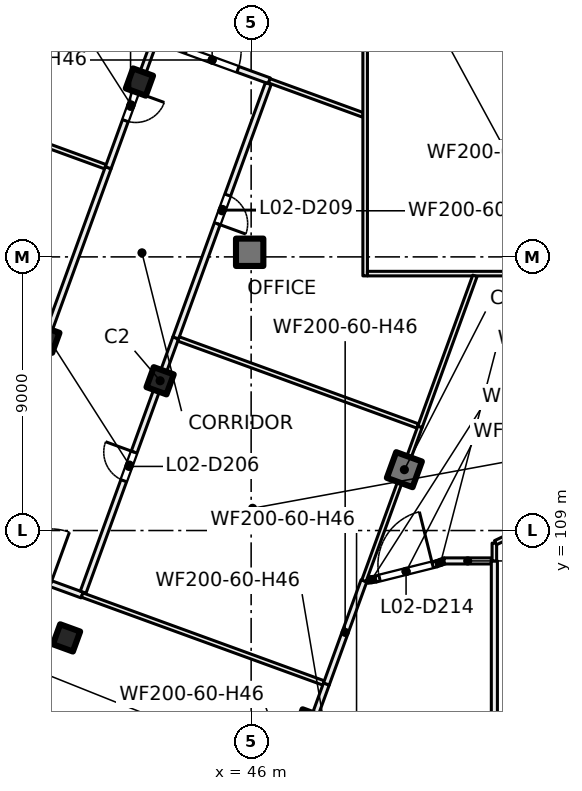
"""IFC4 building model, lengths in metres.
Left out: names, types, materials, properties, quantities, classifications, styles, units other than length and angle.
Written with IfcOpenShell. Run it as: python <this file> out.ifc"""

import sys

from ifc_helpers import new_model, si_unit, direction, frame, frame_2d, origin, origin_2d, place, context, subcontext, project, spatial, rectangle, extrude, element, fill, save


model = new_model("IFC4")
c1 = context("Model", 3, precision=1e-05, world=origin(), true_north=direction((0.0, 1.0)))
c2 = subcontext(c1, "Body", "Model", "MODEL_VIEW")
j1 = project(units=[si_unit("LENGTHUNIT", "METRE"), si_unit("PLANEANGLEUNIT", "RADIAN")], contexts=[c1])
p1 = place(None, origin())
s1 = spatial("IfcSite", under=j1, at=p1, CompositionType="ELEMENT")
p2 = place(p1, origin())
s2 = spatial("IfcBuilding", under=s1, at=p2, CompositionType="ELEMENT")
p3 = place(p2, frame((0.0, 0.0, 12.5)))
s3 = spatial("IfcBuildingStorey", under=s2, at=p3, CompositionType="ELEMENT", Elevation=12.5)
p4 = place(p3, frame((45.952, 118.152, 0.0), z_axis=(0.0, 0.0, 1.0), x_axis=(1.0, 0.0, 0.0)))
e1 = element("IfcColumn", 1, at=p4, inside=s3, PredefinedType="COLUMN", context=c2, shape_type="SweptSolid", body=[
    extrude(rectangle(XDim=0.9, YDim=0.9, at=origin_2d()), origin(), (0.0, 0.0, 1.0), 5.0),
])
for number, where, z_axis, x_axis in (
    (2, (43.006, 113.925, 0.0), (0.0, 0.0, 1.0), (-0.342, -0.94, 0.0)),
    (3, (39.927, 105.468, 0.0), (0.0, 0.0, 1.0), (-0.342, -0.94, 0.0)),
    (4, (42.325, 123.751, 0.0), (0.0, 0.0, 1.0), (-0.342, -0.94, 0.0)),
    (5, (39.247, 115.293, 0.0), (0.0, 0.0, 1.0), (-0.342, -0.94, 0.0)),
):
    element("IfcColumn", number, at=place(p3, frame(where, z_axis=z_axis, x_axis=x_axis)), inside=s3, PredefinedType="COLUMN", context=c2, shape_type="SweptSolid", body=[
        extrude(rectangle(XDim=0.7, YDim=0.7, at=origin_2d()), origin(), (0.0, 0.0, 1.0), 5.0),
    ])
for number, where, z_axis, x_axis in (
    (6, (51.04, 111.001, 0.0), (0.0, 0.0, 1.0), (-0.342, -0.94, 0.0)),
    (7, (47.962, 102.544, 0.0), (0.0, 0.0, 1.0), (-0.342, -0.94, 0.0)),
):
    element("IfcColumn", number, at=place(p3, frame(where, z_axis=z_axis, x_axis=x_axis)), inside=s3, PredefinedType="COLUMN", context=c2, shape_type="SweptSolid", body=[
        extrude(rectangle(XDim=0.9, YDim=0.9, at=origin_2d()), origin(), (0.0, 0.0, 1.0), 5.0),
    ])
p5 = place(p3, frame((33.335, 123.83, 0.0), z_axis=(0.0, 0.0, 1.0), x_axis=(0.939710837098, -0.341970090272, 0.0)))
e8 = element("IfcWall", 8, at=p5, inside=s3, PredefinedType="PARTITIONING", context=c2, shape_type="SweptSolid", body=[
    extrude(rectangle(XDim=8.375, YDim=0.15, at=frame_2d((4.188, 0.0))), origin(), (0.0, 0.0, 1.0), 4.6),
])
p6 = place(p3, frame((40.44, 106.878, 0.0), z_axis=(0.0, 0.0, 1.0), x_axis=(-0.939665029144, 0.342095941228, 0.0)))
e9 = element("IfcWall", 9, at=p6, inside=s3, PredefinedType="PARTITIONING", context=c2, shape_type="SweptSolid", body=[
    extrude(rectangle(XDim=3.999, YDim=0.2, at=frame_2d((2.0, 0.0))), origin(), (0.0, 0.0, 1.0), 4.6),
])
p7 = place(p6, frame((1.099, 0.0, 0.0)))
e10 = element("IfcOpeningElement", 10, at=p7, cuts=e9, PredefinedType="OPENING", context=c2, shape_type="SweptSolid", body=[
    extrude(rectangle(XDim=1.8, YDim=2.1, at=frame_2d((0.9, 1.05))), frame((0.0, 0.11, 0.0), z_axis=(0.0, -1.0, 0.0), x_axis=(1.0, 0.0, 0.0)), (0.0, 0.0, 1.0), 0.22),
])
p8 = place(p3, frame((36.716, 108.34, 0.0), z_axis=(0.0, 0.0, 1.0), x_axis=(0.342018071111, 0.939693375008, 0.0)))
e11 = element("IfcWall", 11, at=p8, inside=s3, PredefinedType="PARTITIONING", context=c2, shape_type="SweptSolid", body=[
    extrude(rectangle(XDim=13.4, YDim=0.2, at=frame_2d((6.7, 0.0))), origin(), (0.0, 0.0, 1.0), 4.6),
])
p9 = place(p8, frame((5.952, 0.0, 0.0)))
e12 = element("IfcOpeningElement", 12, at=p9, cuts=e11, PredefinedType="OPENING", context=c2, shape_type="SweptSolid", body=[
    extrude(rectangle(XDim=1.0, YDim=2.1, at=frame_2d((0.5, 1.05))), frame((0.0, 0.11, 0.0), z_axis=(0.0, -1.0, 0.0), x_axis=(1.0, 0.0, 0.0)), (0.0, 0.0, 1.0), 0.22),
])
p10 = place(p3, frame((43.519, 115.335, 0.0), z_axis=(0.0, 0.0, 1.0), x_axis=(-0.342121866134, -0.939655590476, 0.0)))
e13 = element("IfcWall", 13, at=p10, inside=s3, PredefinedType="PARTITIONING", context=c2, shape_type="SweptSolid", body=[
    extrude(rectangle(XDim=8.9, YDim=0.2, at=frame_2d((4.45, 0.0))), origin(), (0.0, 0.0, 1.0), 4.6),
])
p11 = place(p10, frame((3.998, 0.0, 0.0)))
e14 = element("IfcOpeningElement", 14, at=p11, cuts=e13, PredefinedType="OPENING", context=c2, shape_type="SweptSolid", body=[
    extrude(rectangle(XDim=1.0, YDim=2.1, at=frame_2d((0.5, 1.05))), frame((0.0, 0.11, 0.0), z_axis=(0.0, -1.0, 0.0), x_axis=(1.0, 0.0, 0.0)), (0.0, 0.0, 1.0), 0.22),
])
p12 = place(p3, frame((40.44, 106.878, 0.0), z_axis=(0.0, 0.0, 1.0), x_axis=(0.939672748075, -0.342074738216, 0.0)))
e15 = element("IfcWall", 15, at=p12, inside=s3, PredefinedType="PARTITIONING", context=c2, shape_type="SweptSolid", body=[
    extrude(rectangle(XDim=8.451, YDim=0.15, at=frame_2d((4.226, 0.0))), origin(), (0.0, 0.0, 1.0), 4.6),
])
p13 = place(p3, frame((41.299, 120.932, 0.0), z_axis=(0.0, 0.0, 1.0), x_axis=(0.342063854115, 0.939676710208, 0.0)))
e16 = element("IfcWall", 16, at=p13, inside=s3, PredefinedType="PARTITIONING", context=c2, shape_type="SweptSolid", body=[
    extrude(rectangle(XDim=4.399, YDim=0.2, at=frame_2d((2.2, 0.0))), origin(), (0.0, 0.0, 1.0), 4.6),
])
p14 = place(p13, frame((1.648, 0.0, 0.0)))
e17 = element("IfcOpeningElement", 17, at=p14, cuts=e16, PredefinedType="OPENING", context=c2, shape_type="SweptSolid", body=[
    extrude(rectangle(XDim=1.0, YDim=2.1, at=frame_2d((0.5, 1.05))), frame((0.0, 0.11, 0.0), z_axis=(0.0, -1.0, 0.0), x_axis=(1.0, 0.0, 0.0)), (0.0, 0.0, 1.0), 0.22),
])
p15 = place(p3, frame((42.838, 125.16, 0.0), z_axis=(0.0, 0.0, 1.0), x_axis=(0.939713209288, -0.341963571582, 0.0)))
e18 = element("IfcWall", 18, at=p15, inside=s3, PredefinedType="PARTITIONING", context=c2, shape_type="SweptSolid", body=[
    extrude(rectangle(XDim=4.0, YDim=0.2, at=frame_2d((2.0, 0.0))), origin(), (0.0, 0.0, 1.0), 4.6),
])
p16 = place(p15, frame((1.1, 0.0, 0.0)))
e19 = element("IfcOpeningElement", 19, at=p16, cuts=e18, PredefinedType="OPENING", context=c2, shape_type="SweptSolid", body=[
    extrude(rectangle(XDim=1.8, YDim=2.1, at=frame_2d((0.9, 1.05))), frame((0.0, 0.11, 0.0), z_axis=(0.0, -1.0, 0.0), x_axis=(1.0, 0.0, 0.0)), (0.0, 0.0, 1.0), 0.22),
])
p17 = place(p3, frame((46.563, 123.698, 0.0), z_axis=(0.0, 0.0, 1.0), x_axis=(-0.342024978895, -0.939690860768, 0.0)))
e20 = element("IfcWall", 20, at=p17, inside=s3, PredefinedType="PARTITIONING", context=c2, shape_type="SweptSolid", body=[
    extrude(rectangle(XDim=8.9, YDim=0.2, at=frame_2d((4.45, 0.0))), origin(), (0.0, 0.0, 1.0), 4.6),
])
p18 = place(p17, frame((3.902, 0.0, 0.0)))
e21 = element("IfcOpeningElement", 21, at=p18, cuts=e20, PredefinedType="OPENING", context=c2, shape_type="SweptSolid", body=[
    extrude(rectangle(XDim=1.0, YDim=2.1, at=frame_2d((0.5, 1.05))), frame((0.0, 0.11, 0.0), z_axis=(0.0, -1.0, 0.0), x_axis=(1.0, 0.0, 0.0)), (0.0, 0.0, 1.0), 0.22),
])
p19 = place(p3, frame((43.613, 115.301, 0.0), z_axis=(0.0, 0.0, 1.0), x_axis=(0.93970742794, -0.341979458265, 0.0)))
e22 = element("IfcWall", 22, at=p19, inside=s3, PredefinedType="PARTITIONING", context=c2, shape_type="SweptSolid", body=[
    extrude(rectangle(XDim=8.375, YDim=0.15, at=frame_2d((4.188, 0.0))), origin(), (0.0, 0.0, 1.0), 4.6),
])
p20 = place(p3, frame((46.337, 98.08, 0.0), z_axis=(0.0, 0.0, 1.0), x_axis=(0.342113136459, 0.939658768842, 0.0)))
e23 = element("IfcWall", 23, at=p20, inside=s3, PredefinedType="PARTITIONING", context=c2, shape_type="SweptSolid", body=[
    extrude(rectangle(XDim=6.25, YDim=0.2, at=frame_2d((3.125, 0.0))), origin(), (0.0, 0.0, 1.0), 4.6),
])
p21 = place(p20, frame((2.223, 0.0, 0.0)))
e24 = element("IfcOpeningElement", 24, at=p21, cuts=e23, PredefinedType="OPENING", context=c2, shape_type="SweptSolid", body=[
    extrude(rectangle(XDim=1.8, YDim=2.1, at=frame_2d((0.9, 1.05))), frame((0.0, 0.11, 0.0), z_axis=(0.0, -1.0, 0.0), x_axis=(1.0, 0.0, 0.0)), (0.0, 0.0, 1.0), 0.22),
])
p22 = place(p3, frame((46.597, 123.792, 0.0), z_axis=(0.0, 0.0, 1.0), x_axis=(0.939619227089, -0.342221723572, 0.0)))
e25 = element("IfcWall", 25, at=p22, inside=s3, PredefinedType="PARTITIONING", context=c2, shape_type="SweptSolid", body=[
    extrude(rectangle(XDim=3.276, YDim=0.15, at=frame_2d((1.638, 0.0))), origin(), (0.0, 0.0, 1.0), 4.6),
])
p23 = place(p3, frame((48.475, 103.953, 0.0), z_axis=(0.0, 0.0, 1.0), x_axis=(0.341992779494, 0.939702579955, 0.0)))
e26 = element("IfcWall", 26, at=p23, inside=s3, PredefinedType="PARTITIONING", context=c2, shape_type="SweptSolid", body=[
    extrude(rectangle(XDim=3.611, YDim=0.2, at=frame_2d((1.805, 0.0))), origin(), (0.0, 0.0, 1.0), 4.6),
])
p24 = place(p3, frame((49.823, 107.363, 0.0), z_axis=(0.0, 0.0, 1.0), x_axis=(0.988866439098, 0.148805798359, 0.0)))
e27 = element("IfcWall", 27, at=p24, inside=s3, PredefinedType="PARTITIONING", context=c2, shape_type="SweptSolid", body=[
    extrude(rectangle(XDim=0.282, YDim=0.2, at=frame_2d((0.141, 0.0))), origin(), (0.0, 0.0, 1.0), 4.6),
])
p25 = place(p3, frame((49.71, 107.346, 0.0), z_axis=(0.0, 0.0, 1.0), x_axis=(0.341943087223, 0.939720663336, 0.0)))
e28 = element("IfcWall", 28, at=p25, inside=s3, PredefinedType="PARTITIONING", context=c2, shape_type="SweptSolid", body=[
    extrude(rectangle(XDim=5.39, YDim=0.15, at=frame_2d((2.695, 0.0))), origin(), (0.0, 0.0, 1.0), 4.6),
])
p26 = place(p3, frame((49.75, 117.375, 0.0), z_axis=(0.0, 0.0, 1.0), x_axis=(0.0, 1.0, 0.0)))
e29 = element("IfcWall", 29, at=p26, inside=s3, PredefinedType="PARTITIONING", context=c2, shape_type="SweptSolid", body=[
    extrude(rectangle(XDim=8.625, YDim=0.15, at=frame_2d((4.312, 0.0))), origin(), (0.0, 0.0, 1.0), 4.6),
])
p27 = place(p3, frame((49.825, 117.45, 0.0), z_axis=(0.0, 0.0, 1.0), x_axis=(1.0, 0.0, 0.0)))
e30 = element("IfcWall", 30, at=p27, inside=s3, PredefinedType="PARTITIONING", context=c2, shape_type="SweptSolid", body=[
    extrude(rectangle(XDim=41.175, YDim=0.15, at=frame_2d((20.587, 0.0))), origin(), (0.0, 0.0, 1.0), 4.6),
])
p28 = place(p3, frame((52.101, 107.905, 0.0), z_axis=(0.0, 0.0, 1.0), x_axis=(-0.970177165917, -0.242396919811, 0.0)))
e31 = element("IfcWall", 31, at=p28, inside=s3, PredefinedType="PARTITIONING", context=c2, shape_type="SweptSolid", body=[
    extrude(rectangle(XDim=2.071, YDim=0.2, at=frame_2d((1.035, 0.0))), origin(), (0.0, 0.0, 1.0), 4.6),
])
p29 = place(p28, frame((0.136, 0.0, 0.0)))
e32 = element("IfcOpeningElement", 32, at=p29, cuts=e31, PredefinedType="OPENING", context=c2, shape_type="SweptSolid", body=[
    extrude(rectangle(XDim=1.8, YDim=2.1, at=frame_2d((0.9, 1.05))), frame((0.0, 0.11, 0.0), z_axis=(0.0, -1.0, 0.0), x_axis=(1.0, 0.0, 0.0)), (0.0, 0.0, 1.0), 0.22),
])
p30 = place(p3, frame((51.553, 112.411, 0.0), z_axis=(0.0, 0.0, 1.0), x_axis=(0.342076997639, 0.93967192556, 0.0)))
e33 = element("IfcWall", 33, at=p30, inside=s3, PredefinedType="PARTITIONING", context=c2, shape_type="SweptSolid", body=[
    extrude(rectangle(XDim=5.283, YDim=0.15, at=frame_2d((2.641, 0.0))), origin(), (0.0, 0.0, 1.0), 4.6),
])
p31 = place(p3, frame((52.091, 107.902, 0.0), z_axis=(0.0, 0.0, 1.0), x_axis=(0.940856992367, 0.338803954986, 0.0)))
e34 = element("IfcWall", 34, at=p31, inside=s3, PredefinedType="PARTITIONING", context=c2, shape_type="SweptSolid", body=[
    extrude(rectangle(XDim=0.307, YDim=0.2, at=frame_2d((0.153, 0.0))), origin(), (0.0, 0.0, 1.0), 4.6),
])
p32 = place(p3, frame((52.347, 108.0, 0.0), z_axis=(0.0, 0.0, 1.0), x_axis=(1.0, 0.0, 0.0)))
e35 = element("IfcWall", 35, at=p32, inside=s3, PredefinedType="PARTITIONING", context=c2, shape_type="SweptSolid", body=[
    extrude(rectangle(XDim=1.553, YDim=0.2, at=frame_2d((0.776, 0.0))), origin(), (0.0, 0.0, 1.0), 4.6),
])
p33 = place(p3, frame((53.348, 75.152, 0.0), z_axis=(0.0, 0.0, 1.0), x_axis=(0.342006895874, 0.939697442358, 0.0)))
e36 = element("IfcWall", 36, at=p33, inside=s3, PredefinedType="PARTITIONING", context=c2, shape_type="SweptSolid", body=[
    extrude(rectangle(XDim=29.792, YDim=0.3, at=frame_2d((14.896, 0.0))), origin(), (0.0, 0.0, 1.0), 6.1),
])
p34 = place(p3, frame((101.764, 103.0, 0.0), z_axis=(0.0, 0.0, 1.0), x_axis=(-0.866697259032, -0.498834502802, 0.0)))
e37 = element("IfcWall", 37, at=p34, inside=s3, PredefinedType="PARTITIONING", context=c2, shape_type="SweptSolid", body=[
    extrude(rectangle(XDim=55.547, YDim=0.3, at=frame_2d((27.774, 0.0))), origin(), (0.0, 0.0, 1.0), 6.1),
])
p35 = place(p34, frame((43.673, 0.0, 0.0)))
e38 = element("IfcOpeningElement", 38, at=p35, cuts=e37, PredefinedType="OPENING", context=c2, shape_type="SweptSolid", body=[
    extrude(rectangle(XDim=2.0, YDim=2.1, at=frame_2d((1.0, 1.05))), frame((0.0, 0.16, 0.0), z_axis=(0.0, -1.0, 0.0), x_axis=(1.0, 0.0, 0.0)), (0.0, 0.0, 1.0), 0.32),
])
p36 = place(p34, frame((26.921, 0.0, 0.0)))
e39 = element("IfcOpeningElement", 39, at=p36, cuts=e37, PredefinedType="OPENING", context=c2, shape_type="SweptSolid", body=[
    extrude(rectangle(XDim=2.0, YDim=2.1, at=frame_2d((1.0, 1.05))), frame((0.0, 0.16, 0.0), z_axis=(0.0, -1.0, 0.0), x_axis=(1.0, 0.0, 0.0)), (0.0, 0.0, 1.0), 0.32),
])
p37 = place(p34, frame((10.169, 0.0, 0.0)))
e40 = element("IfcOpeningElement", 40, at=p37, cuts=e37, PredefinedType="OPENING", context=c2, shape_type="SweptSolid", body=[
    extrude(rectangle(XDim=2.0, YDim=2.1, at=frame_2d((1.0, 1.05))), frame((0.0, 0.16, 0.0), z_axis=(0.0, -1.0, 0.0), x_axis=(1.0, 0.0, 0.0)), (0.0, 0.0, 1.0), 0.32),
])
p38 = place(p3, frame((54.0, 94.715, 0.0), z_axis=(0.0, 0.0, 1.0), x_axis=(0.0, 1.0, 0.0)))
e41 = element("IfcWall", 41, at=p38, inside=s3, PredefinedType="PARTITIONING", context=c2, shape_type="SweptSolid", body=[
    extrude(rectangle(XDim=13.285, YDim=0.2, at=frame_2d((6.643, 0.0))), origin(), (0.0, 0.0, 1.0), 4.6),
])
p39 = place(p3, frame((54.0, 94.429, 0.0), z_axis=(0.0, 0.0, 1.0), x_axis=(0.342085241875, 0.939668924298, 0.0)))
e42 = element("IfcWall", 42, at=p39, inside=s3, PredefinedType="PARTITIONING", context=c2, shape_type="SweptSolid", body=[
    extrude(rectangle(XDim=15.581, YDim=0.15, at=frame_2d((7.791, 0.0))), origin(), (0.0, 0.0, 1.0), 4.6),
])
p40 = place(p3, frame((54.0, 108.0, 0.0), z_axis=(0.0, 0.0, 1.0), x_axis=(0.0, 1.0, 0.0)))
e43 = element("IfcWall", 43, at=p40, inside=s3, PredefinedType="PARTITIONING", context=c2, shape_type="SweptSolid", body=[
    extrude(rectangle(XDim=0.586, YDim=0.15, at=frame_2d((0.293, 0.0))), origin(), (0.0, 0.0, 1.0), 4.6),
])
p41 = place(p3, frame((54.036, 108.599, 0.0), z_axis=(0.0, 0.0, 1.0), x_axis=(0.903959249768, 0.427618608995, 0.0)))
e44 = element("IfcWall", 44, at=p41, inside=s3, PredefinedType="PARTITIONING", context=c2, shape_type="SweptSolid", body=[
    extrude(rectangle(XDim=2.064, YDim=0.15, at=frame_2d((1.032, 0.0))), origin(), (0.0, 0.0, 1.0), 4.6),
])
p42 = place(p11, origin())
e45 = element("IfcDoor", 45, at=p42, inside=s3, OperationType="SINGLE_SWING_LEFT", PredefinedType="DOOR", context=c2, shape_type="SweptSolid", body=[
    extrude(rectangle(XDim=1.0, YDim=2.1, at=frame_2d((0.5, 1.05))), frame((0.0, 0.025, 0.0), z_axis=(0.0, -1.0, 0.0), x_axis=(1.0, 0.0, 0.0)), (0.0, 0.0, 1.0), 0.05),
])
fill(e14, e45)
p43 = place(p14, origin())
e46 = element("IfcDoor", 46, at=p43, inside=s3, OperationType="SINGLE_SWING_RIGHT", PredefinedType="DOOR", context=c2, shape_type="SweptSolid", body=[
    extrude(rectangle(XDim=1.0, YDim=2.1, at=frame_2d((0.5, 1.05))), frame((0.0, 0.025, 0.0), z_axis=(0.0, -1.0, 0.0), x_axis=(1.0, 0.0, 0.0)), (0.0, 0.0, 1.0), 0.05),
])
fill(e17, e46)
p44 = place(p16, origin())
e47 = element("IfcDoor", 47, at=p44, inside=s3, OperationType="DOUBLE_DOOR_SINGLE_SWING", PredefinedType="DOOR", context=c2, shape_type="SweptSolid", body=[
    extrude(rectangle(XDim=1.8, YDim=2.1, at=frame_2d((0.9, 1.05))), frame((0.0, 0.025, 0.0), z_axis=(0.0, -1.0, 0.0), x_axis=(1.0, 0.0, 0.0)), (0.0, 0.0, 1.0), 0.05),
])
fill(e19, e47)
p45 = place(p18, origin())
e48 = element("IfcDoor", 48, at=p45, inside=s3, OperationType="SINGLE_SWING_RIGHT", PredefinedType="DOOR", context=c2, shape_type="SweptSolid", body=[
    extrude(rectangle(XDim=1.0, YDim=2.1, at=frame_2d((0.5, 1.05))), frame((0.0, 0.025, 0.0), z_axis=(0.0, -1.0, 0.0), x_axis=(1.0, 0.0, 0.0)), (0.0, 0.0, 1.0), 0.05),
])
fill(e21, e48)
p46 = place(p29, origin())
e49 = element("IfcDoor", 49, at=p46, inside=s3, OperationType="DOUBLE_DOOR_SINGLE_SWING", PredefinedType="DOOR", context=c2, shape_type="SweptSolid", body=[
    extrude(rectangle(XDim=1.8, YDim=2.1, at=frame_2d((0.9, 1.05))), frame((0.0, 0.025, 0.0), z_axis=(0.0, -1.0, 0.0), x_axis=(1.0, 0.0, 0.0)), (0.0, 0.0, 1.0), 0.05),
])
fill(e32, e49)
save(model, sys.argv[1])
